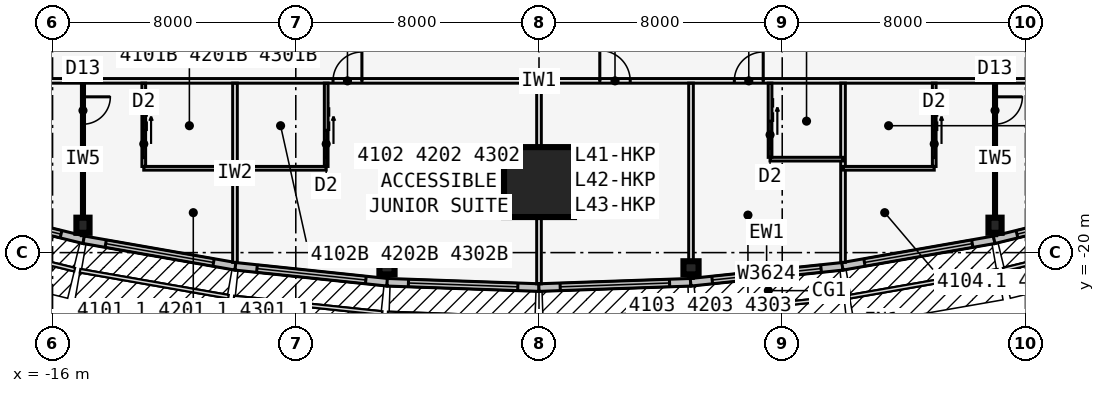
"""IFC4 building model, lengths in metres.
Left out: names, types, materials, properties, quantities, classifications, styles, units other than length and angle.
Written with IfcOpenShell. Run it as: python <this file> out.ifc"""

import sys

from ifc_helpers import new_model, si_unit, direction, frame, frame_2d, origin, origin_2d, place, context, subcontext, project, spatial, rectangle, i_section, extrude, element, fill, save


model = new_model("IFC4")
c1 = context("Model", 3, precision=1e-05, world=origin(), true_north=direction((0.0, 1.0)))
c2 = subcontext(c1, "Body", "Model", "MODEL_VIEW")
j1 = project(units=[si_unit("LENGTHUNIT", "METRE"), si_unit("PLANEANGLEUNIT", "RADIAN")], contexts=[c1])
p1 = place(None, origin())
s1 = spatial("IfcSite", under=j1, at=p1, CompositionType="ELEMENT")
p2 = place(p1, origin())
s2 = spatial("IfcBuilding", under=s1, at=p2, CompositionType="ELEMENT")
p3 = place(p2, frame((0.0, 0.0, 155.5)))
s3 = spatial("IfcBuildingStorey", under=s2, at=p3, CompositionType="ELEMENT", Elevation=155.5)
for number, where, z_axis, x_axis in (
    (1, (-15.0, -19.1, 0.0), (0.0, 0.0, 1.0), (1.0, 0.0, 0.0)),
    (2, (-5.0, -20.5, 0.0), (0.0, 0.0, 1.0), (0.0, -1.0, 0.0)),
    (3, (5.0, -20.5, 0.0), (0.0, 0.0, 1.0), (0.0, -1.0, 0.0)),
    (4, (15.0, -19.1, 0.0), (0.0, 0.0, 1.0), (1.0, 0.0, 0.0)),
):
    element("IfcColumn", number, at=place(p3, frame(where, z_axis=z_axis, x_axis=x_axis)), inside=s3, PredefinedType="COLUMN", context=c2, shape_type="SweptSolid", body=[
        extrude(i_section(OverallWidth=0.432, OverallDepth=0.498, WebThickness=0.056, FlangeThickness=0.089, at=origin_2d()), origin(), (0.0, 0.0, 1.0), 3.4),
    ])
p4 = place(p3, frame((0.0, -17.68, 0.0), z_axis=(0.0, 0.0, 1.0), x_axis=(0.0, -1.0, 0.0)))
e5 = element("IfcColumn", 5, at=p4, inside=s3, PredefinedType="COLUMN", context=c2, shape_type="SweptSolid", body=[
    extrude(rectangle(XDim=2.3, YDim=2.3, at=origin_2d()), origin(), (0.0, 0.0, 1.0), 3.4),
])
p5 = place(p3, frame((-19.97, -18.354, 0.0), z_axis=(0.0, 0.0, 1.0), x_axis=(0.971270024053, -0.237980126011, 0.0)))
e6 = element("IfcWall", 6, at=p5, inside=s3, PredefinedType="STANDARD", context=c2, shape_type="SweptSolid", body=[
    extrude(rectangle(XDim=5.148, YDim=0.25, at=frame_2d((2.574, 0.0))), origin(), (0.0, 0.0, 1.0), 3.235),
])
p6 = place(p5, frame((0.774, 0.0, 0.45)))
e7 = element("IfcOpeningElement", 7, at=p6, cuts=e6, PredefinedType="OPENING", context=c2, shape_type="SweptSolid", body=[
    extrude(rectangle(XDim=3.6, YDim=2.4, at=frame_2d((1.8, 1.2))), frame((0.0, 0.135, 0.0), z_axis=(0.0, -1.0, 0.0), x_axis=(1.0, 0.0, 0.0)), (0.0, 0.0, 1.0), 0.27),
])
p7 = place(p3, frame((-14.979, -19.577, 0.0), z_axis=(0.0, 0.0, 1.0), x_axis=(0.985030467156, -0.172380331752, 0.0)))
e8 = element("IfcWall", 8, at=p7, inside=s3, PredefinedType="STANDARD", context=c2, shape_type="SweptSolid", body=[
    extrude(rectangle(XDim=5.076, YDim=0.25, at=frame_2d((2.538, 0.0))), origin(), (0.0, 0.0, 1.0), 3.235),
])
p8 = place(p7, frame((0.738, 0.0, 0.45)))
e9 = element("IfcOpeningElement", 9, at=p8, cuts=e8, PredefinedType="OPENING", context=c2, shape_type="SweptSolid", body=[
    extrude(rectangle(XDim=3.6, YDim=2.4, at=frame_2d((1.8, 1.2))), frame((0.0, 0.135, 0.0), z_axis=(0.0, -1.0, 0.0), x_axis=(1.0, 0.0, 0.0)), (0.0, 0.0, 1.0), 0.27),
])
p9 = place(p3, frame((-9.987, -20.451, 0.0), z_axis=(0.0, 0.0, 1.0), x_axis=(0.994534683851, -0.104406717299, 0.0)))
e10 = element("IfcWall", 10, at=p9, inside=s3, PredefinedType="STANDARD", context=c2, shape_type="SweptSolid", body=[
    extrude(rectangle(XDim=5.028, YDim=0.25, at=frame_2d((2.514, 0.0))), origin(), (0.0, 0.0, 1.0), 3.235),
])
p10 = place(p9, frame((0.714, 0.0, 0.45)))
e11 = element("IfcOpeningElement", 11, at=p10, cuts=e10, PredefinedType="OPENING", context=c2, shape_type="SweptSolid", body=[
    extrude(rectangle(XDim=3.6, YDim=2.4, at=frame_2d((1.8, 1.2))), frame((0.0, 0.135, 0.0), z_axis=(0.0, -1.0, 0.0), x_axis=(1.0, 0.0, 0.0)), (0.0, 0.0, 1.0), 0.27),
])
p11 = place(p3, frame((-4.996, -20.975, 0.0), z_axis=(0.0, 0.0, 1.0), x_axis=(0.999387720943, -0.034988329879, 0.0)))
e12 = element("IfcWall", 12, at=p11, inside=s3, PredefinedType="STANDARD", context=c2, shape_type="SweptSolid", body=[
    extrude(rectangle(XDim=5.003, YDim=0.25, at=frame_2d((2.501, 0.0))), origin(), (0.0, 0.0, 1.0), 3.235),
])
p12 = place(p11, frame((0.701, 0.0, 0.45)))
e13 = element("IfcOpeningElement", 13, at=p12, cuts=e12, PredefinedType="OPENING", context=c2, shape_type="SweptSolid", body=[
    extrude(rectangle(XDim=3.6, YDim=2.4, at=frame_2d((1.8, 1.2))), frame((0.0, 0.135, 0.0), z_axis=(0.0, -1.0, 0.0), x_axis=(1.0, 0.0, 0.0)), (0.0, 0.0, 1.0), 0.27),
])
p13 = place(p3, frame((-0.004, -21.15, 0.0), z_axis=(0.0, 0.0, 1.0), x_axis=(0.999387720943, 0.034988329879, 0.0)))
e14 = element("IfcWall", 14, at=p13, inside=s3, PredefinedType="STANDARD", context=c2, shape_type="SweptSolid", body=[
    extrude(rectangle(XDim=5.003, YDim=0.25, at=frame_2d((2.501, 0.0))), origin(), (0.0, 0.0, 1.0), 3.235),
])
p14 = place(p13, frame((0.701, 0.0, 0.45)))
e15 = element("IfcOpeningElement", 15, at=p14, cuts=e14, PredefinedType="OPENING", context=c2, shape_type="SweptSolid", body=[
    extrude(rectangle(XDim=3.6, YDim=2.4, at=frame_2d((1.8, 1.2))), frame((0.0, 0.135, 0.0), z_axis=(0.0, -1.0, 0.0), x_axis=(1.0, 0.0, 0.0)), (0.0, 0.0, 1.0), 0.27),
])
p15 = place(p3, frame((4.987, -20.976, 0.0), z_axis=(0.0, 0.0, 1.0), x_axis=(0.994534683851, 0.104406717299, 0.0)))
e16 = element("IfcWall", 16, at=p15, inside=s3, PredefinedType="STANDARD", context=c2, shape_type="SweptSolid", body=[
    extrude(rectangle(XDim=5.028, YDim=0.25, at=frame_2d((2.514, 0.0))), origin(), (0.0, 0.0, 1.0), 3.235),
])
p16 = place(p15, frame((0.714, 0.0, 0.45)))
e17 = element("IfcOpeningElement", 17, at=p16, cuts=e16, PredefinedType="OPENING", context=c2, shape_type="SweptSolid", body=[
    extrude(rectangle(XDim=3.6, YDim=2.4, at=frame_2d((1.8, 1.2))), frame((0.0, 0.135, 0.0), z_axis=(0.0, -1.0, 0.0), x_axis=(1.0, 0.0, 0.0)), (0.0, 0.0, 1.0), 0.27),
])
p17 = place(p3, frame((9.979, -20.452, 0.0), z_axis=(0.0, 0.0, 1.0), x_axis=(0.985030467156, 0.172380331752, 0.0)))
e18 = element("IfcWall", 18, at=p17, inside=s3, PredefinedType="STANDARD", context=c2, shape_type="SweptSolid", body=[
    extrude(rectangle(XDim=5.076, YDim=0.25, at=frame_2d((2.538, 0.0))), origin(), (0.0, 0.0, 1.0), 3.235),
])
p18 = place(p17, frame((0.738, 0.0, 0.45)))
e19 = element("IfcOpeningElement", 19, at=p18, cuts=e18, PredefinedType="OPENING", context=c2, shape_type="SweptSolid", body=[
    extrude(rectangle(XDim=3.6, YDim=2.4, at=frame_2d((1.8, 1.2))), frame((0.0, 0.135, 0.0), z_axis=(0.0, -1.0, 0.0), x_axis=(1.0, 0.0, 0.0)), (0.0, 0.0, 1.0), 0.27),
])
p19 = place(p3, frame((14.97, -19.579, 0.0), z_axis=(0.0, 0.0, 1.0), x_axis=(0.971270024053, 0.237980126011, 0.0)))
e20 = element("IfcWall", 20, at=p19, inside=s3, PredefinedType="STANDARD", context=c2, shape_type="SweptSolid", body=[
    extrude(rectangle(XDim=5.148, YDim=0.25, at=frame_2d((2.574, 0.0))), origin(), (0.0, 0.0, 1.0), 3.235),
])
p20 = place(p19, frame((0.774, 0.0, 0.45)))
e21 = element("IfcOpeningElement", 21, at=p20, cuts=e20, PredefinedType="OPENING", context=c2, shape_type="SweptSolid", body=[
    extrude(rectangle(XDim=3.6, YDim=2.4, at=frame_2d((1.8, 1.2))), frame((0.0, 0.135, 0.0), z_axis=(0.0, -1.0, 0.0), x_axis=(1.0, 0.0, 0.0)), (0.0, 0.0, 1.0), 0.27),
])
p21 = place(p3, frame((-23.857, -14.351, 0.0), z_axis=(0.0, 0.0, 1.0), x_axis=(1.0, 0.0, 0.0)))
e22 = element("IfcWall", 22, at=p21, inside=s3, PredefinedType="PARTITIONING", context=c2, shape_type="SweptSolid", body=[
    extrude(rectangle(XDim=47.714, YDim=0.15, at=frame_2d((23.857, 0.0))), origin(), (0.0, 0.0, 1.0), 3.235),
])
p22 = place(p21, frame((3.723, 0.0, 0.0)))
e23 = element("IfcOpeningElement", 23, at=p22, cuts=e22, PredefinedType="OPENING", context=c2, shape_type="SweptSolid", body=[
    extrude(rectangle(XDim=0.95, YDim=2.13, at=frame_2d((0.475, 1.065))), frame((0.0, 0.085, 0.0), z_axis=(0.0, -1.0, 0.0), x_axis=(1.0, 0.0, 0.0)), (0.0, 0.0, 1.0), 0.17),
])
p23 = place(p21, frame((17.082, 0.0, 0.0)))
e24 = element("IfcOpeningElement", 24, at=p23, cuts=e22, PredefinedType="OPENING", context=c2, shape_type="SweptSolid", body=[
    extrude(rectangle(XDim=0.95, YDim=2.13, at=frame_2d((0.475, 1.065))), frame((0.0, 0.085, 0.0), z_axis=(0.0, -1.0, 0.0), x_axis=(1.0, 0.0, 0.0)), (0.0, 0.0, 1.0), 0.17),
])
p24 = place(p21, frame((25.857, 0.0, 0.0)))
e25 = element("IfcOpeningElement", 25, at=p24, cuts=e22, PredefinedType="OPENING", context=c2, shape_type="SweptSolid", body=[
    extrude(rectangle(XDim=1.0, YDim=2.13, at=frame_2d((0.5, 1.065))), frame((0.0, 0.085, 0.0), z_axis=(0.0, -1.0, 0.0), x_axis=(1.0, 0.0, 0.0)), (0.0, 0.0, 1.0), 0.17),
])
p25 = place(p21, frame((30.282, 0.0, 0.0)))
e26 = element("IfcOpeningElement", 26, at=p25, cuts=e22, PredefinedType="OPENING", context=c2, shape_type="SweptSolid", body=[
    extrude(rectangle(XDim=0.95, YDim=2.13, at=frame_2d((0.475, 1.065))), frame((0.0, 0.085, 0.0), z_axis=(0.0, -1.0, 0.0), x_axis=(1.0, 0.0, 0.0)), (0.0, 0.0, 1.0), 0.17),
])
p26 = place(p21, frame((43.041, 0.0, 0.0)))
e27 = element("IfcOpeningElement", 27, at=p26, cuts=e22, PredefinedType="OPENING", context=c2, shape_type="SweptSolid", body=[
    extrude(rectangle(XDim=0.95, YDim=2.13, at=frame_2d((0.475, 1.065))), frame((0.0, 0.085, 0.0), z_axis=(0.0, -1.0, 0.0), x_axis=(1.0, 0.0, 0.0)), (0.0, 0.0, 1.0), 0.17),
])
p27 = place(p3, frame((-15.0, -14.426, 0.0), z_axis=(0.0, 0.0, 1.0), x_axis=(0.0, -1.0, 0.0)))
e28 = element("IfcWall", 28, at=p27, inside=s3, PredefinedType="PARTITIONING", context=c2, shape_type="SweptSolid", body=[
    extrude(rectangle(XDim=5.017, YDim=0.1, at=frame_2d((2.508, 0.0))), origin(), (0.0, 0.0, 1.0), 2.389),
])
p28 = place(p27, frame((0.45, 0.0, 0.0)))
e29 = element("IfcOpeningElement", 29, at=p28, cuts=e28, PredefinedType="OPENING", context=c2, shape_type="SweptSolid", body=[
    extrude(rectangle(XDim=0.9, YDim=2.13, at=frame_2d((0.45, 1.065))), frame((0.0, 0.06, 0.0), z_axis=(0.0, -1.0, 0.0), x_axis=(1.0, 0.0, 0.0)), (0.0, 0.0, 1.0), 0.12),
])
p29 = place(p3, frame((-10.0, -14.426, 0.0), z_axis=(0.0, 0.0, 1.0), x_axis=(0.0, -1.0, 0.0)))
e30 = element("IfcWall", 30, at=p29, inside=s3, PredefinedType="PARTITIONING", context=c2, shape_type="SweptSolid", body=[
    extrude(rectangle(XDim=5.895, YDim=0.15, at=frame_2d((2.948, 0.0))), origin(), (0.0, 0.0, 1.0), 2.389),
])
p30 = place(p3, frame((0.0, -14.426, 0.0), z_axis=(0.0, 0.0, 1.0), x_axis=(0.0, -1.0, 0.0)))
e31 = element("IfcWall", 31, at=p30, inside=s3, PredefinedType="PARTITIONING", context=c2, shape_type="SweptSolid", body=[
    extrude(rectangle(XDim=6.599, YDim=0.15, at=frame_2d((3.299, 0.0))), origin(), (0.0, 0.0, 1.0), 2.389),
])
p31 = place(p3, frame((5.0, -14.426, 0.0), z_axis=(0.0, 0.0, 1.0), x_axis=(0.0, -1.0, 0.0)))
e32 = element("IfcWall", 32, at=p31, inside=s3, PredefinedType="PARTITIONING", context=c2, shape_type="SweptSolid", body=[
    extrude(rectangle(XDim=6.423, YDim=0.15, at=frame_2d((3.211, 0.0))), origin(), (0.0, 0.0, 1.0), 2.389),
])
p32 = place(p3, frame((10.0, -14.426, 0.0), z_axis=(0.0, 0.0, 1.0), x_axis=(0.0, -1.0, 0.0)))
e33 = element("IfcWall", 33, at=p32, inside=s3, PredefinedType="PARTITIONING", context=c2, shape_type="SweptSolid", body=[
    extrude(rectangle(XDim=5.895, YDim=0.15, at=frame_2d((2.948, 0.0))), origin(), (0.0, 0.0, 1.0), 2.389),
])
p33 = place(p3, frame((15.0, -14.426, 0.0), z_axis=(0.0, 0.0, 1.0), x_axis=(0.0, -1.0, 0.0)))
e34 = element("IfcWall", 34, at=p33, inside=s3, PredefinedType="PARTITIONING", context=c2, shape_type="SweptSolid", body=[
    extrude(rectangle(XDim=5.017, YDim=0.1, at=frame_2d((2.508, 0.0))), origin(), (0.0, 0.0, 1.0), 2.389),
])
p34 = place(p33, frame((0.45, 0.0, 0.0)))
e35 = element("IfcOpeningElement", 35, at=p34, cuts=e34, PredefinedType="OPENING", context=c2, shape_type="SweptSolid", body=[
    extrude(rectangle(XDim=0.9, YDim=2.13, at=frame_2d((0.45, 1.065))), frame((0.0, 0.06, 0.0), z_axis=(0.0, -1.0, 0.0), x_axis=(1.0, 0.0, 0.0)), (0.0, 0.0, 1.0), 0.12),
])
p35 = place(p3, frame((-13.0, -17.226, 0.0), z_axis=(0.0, 0.0, 1.0), x_axis=(1.0, 0.0, 0.0)))
e36 = element("IfcWall", 36, at=p35, inside=s3, PredefinedType="PLUMBINGWALL", context=c2, shape_type="SweptSolid", body=[
    extrude(rectangle(XDim=3.0, YDim=0.12, at=frame_2d((1.5, 0.0))), origin(), (0.0, 0.0, 1.0), 3.235),
])
p36 = place(p3, frame((-13.0, -14.426, 0.0), z_axis=(0.0, 0.0, 1.0), x_axis=(0.0, -1.0, 0.0)))
e37 = element("IfcWall", 37, at=p36, inside=s3, PredefinedType="PLUMBINGWALL", context=c2, shape_type="SweptSolid", body=[
    extrude(rectangle(XDim=2.74, YDim=0.12, at=frame_2d((1.37, 0.0))), origin(), (0.0, 0.0, 1.0), 3.235),
])
p37 = place(p36, frame((1.55, 0.0, 0.0)))
e38 = element("IfcOpeningElement", 38, at=p37, cuts=e37, PredefinedType="OPENING", context=c2, shape_type="SweptSolid", body=[
    extrude(rectangle(XDim=0.9, YDim=2.13, at=frame_2d((0.45, 1.065))), frame((0.0, 0.07, 0.0), z_axis=(0.0, -1.0, 0.0), x_axis=(1.0, 0.0, 0.0)), (0.0, 0.0, 1.0), 0.14),
])
p38 = place(p3, frame((-10.0, -17.226, 0.0), z_axis=(0.0, 0.0, 1.0), x_axis=(1.0, 0.0, 0.0)))
e39 = element("IfcWall", 39, at=p38, inside=s3, PredefinedType="PLUMBINGWALL", context=c2, shape_type="SweptSolid", body=[
    extrude(rectangle(XDim=3.0, YDim=0.12, at=frame_2d((1.5, 0.0))), origin(), (0.0, 0.0, 1.0), 3.235),
])
p39 = place(p3, frame((-7.0, -14.426, 0.0), z_axis=(0.0, 0.0, 1.0), x_axis=(0.0, -1.0, 0.0)))
e40 = element("IfcWall", 40, at=p39, inside=s3, PredefinedType="PLUMBINGWALL", context=c2, shape_type="SweptSolid", body=[
    extrude(rectangle(XDim=2.74, YDim=0.12, at=frame_2d((1.37, 0.0))), origin(), (0.0, 0.0, 1.0), 3.235),
])
p40 = place(p39, frame((1.55, 0.0, 0.0)))
e41 = element("IfcOpeningElement", 41, at=p40, cuts=e40, PredefinedType="OPENING", context=c2, shape_type="SweptSolid", body=[
    extrude(rectangle(XDim=0.9, YDim=2.13, at=frame_2d((0.45, 1.065))), frame((0.0, 0.07, 0.0), z_axis=(0.0, -1.0, 0.0), x_axis=(1.0, 0.0, 0.0)), (0.0, 0.0, 1.0), 0.14),
])
p41 = place(p3, frame((7.6, -16.926, 0.0), z_axis=(0.0, 0.0, 1.0), x_axis=(1.0, 0.0, 0.0)))
e42 = element("IfcWall", 42, at=p41, inside=s3, PredefinedType="PLUMBINGWALL", context=c2, shape_type="SweptSolid", body=[
    extrude(rectangle(XDim=2.4, YDim=0.12, at=frame_2d((1.2, 0.0))), origin(), (0.0, 0.0, 1.0), 3.235),
])
p42 = place(p3, frame((7.6, -14.426, 0.0), z_axis=(0.0, 0.0, 1.0), x_axis=(0.0, -1.0, 0.0)))
e43 = element("IfcWall", 43, at=p42, inside=s3, PredefinedType="PLUMBINGWALL", context=c2, shape_type="SweptSolid", body=[
    extrude(rectangle(XDim=2.44, YDim=0.12, at=frame_2d((1.22, 0.0))), origin(), (0.0, 0.0, 1.0), 3.235),
])
p43 = place(p42, frame((1.25, 0.0, 0.0)))
e44 = element("IfcOpeningElement", 44, at=p43, cuts=e43, PredefinedType="OPENING", context=c2, shape_type="SweptSolid", body=[
    extrude(rectangle(XDim=0.9, YDim=2.13, at=frame_2d((0.45, 1.065))), frame((0.0, 0.07, 0.0), z_axis=(0.0, -1.0, 0.0), x_axis=(1.0, 0.0, 0.0)), (0.0, 0.0, 1.0), 0.14),
])
p44 = place(p3, frame((10.0, -17.226, 0.0), z_axis=(0.0, 0.0, 1.0), x_axis=(1.0, 0.0, 0.0)))
e45 = element("IfcWall", 45, at=p44, inside=s3, PredefinedType="PLUMBINGWALL", context=c2, shape_type="SweptSolid", body=[
    extrude(rectangle(XDim=3.0, YDim=0.12, at=frame_2d((1.5, 0.0))), origin(), (0.0, 0.0, 1.0), 3.235),
])
p45 = place(p3, frame((13.0, -14.426, 0.0), z_axis=(0.0, 0.0, 1.0), x_axis=(0.0, -1.0, 0.0)))
e46 = element("IfcWall", 46, at=p45, inside=s3, PredefinedType="PLUMBINGWALL", context=c2, shape_type="SweptSolid", body=[
    extrude(rectangle(XDim=2.74, YDim=0.12, at=frame_2d((1.37, 0.0))), origin(), (0.0, 0.0, 1.0), 3.235),
])
p46 = place(p45, frame((1.55, 0.0, 0.0)))
e47 = element("IfcOpeningElement", 47, at=p46, cuts=e46, PredefinedType="OPENING", context=c2, shape_type="SweptSolid", body=[
    extrude(rectangle(XDim=0.9, YDim=2.13, at=frame_2d((0.45, 1.065))), frame((0.0, 0.07, 0.0), z_axis=(0.0, -1.0, 0.0), x_axis=(1.0, 0.0, 0.0)), (0.0, 0.0, 1.0), 0.14),
])
p47 = place(p6, origin())
e48 = element("IfcWindow", 48, at=p47, inside=s3, PartitioningType="SINGLE_PANEL", PredefinedType="WINDOW", context=c2, shape_type="SweptSolid", body=[
    extrude(rectangle(XDim=3.6, YDim=2.4, at=frame_2d((1.8, 1.2))), frame((0.0, 0.03, 0.0), z_axis=(0.0, -1.0, 0.0), x_axis=(1.0, 0.0, 0.0)), (0.0, 0.0, 1.0), 0.06),
])
fill(e7, e48)
p48 = place(p8, origin())
e49 = element("IfcWindow", 49, at=p48, inside=s3, PartitioningType="SINGLE_PANEL", PredefinedType="WINDOW", context=c2, shape_type="SweptSolid", body=[
    extrude(rectangle(XDim=3.6, YDim=2.4, at=frame_2d((1.8, 1.2))), frame((0.0, 0.03, 0.0), z_axis=(0.0, -1.0, 0.0), x_axis=(1.0, 0.0, 0.0)), (0.0, 0.0, 1.0), 0.06),
])
fill(e9, e49)
p49 = place(p10, origin())
e50 = element("IfcWindow", 50, at=p49, inside=s3, PartitioningType="SINGLE_PANEL", PredefinedType="WINDOW", context=c2, shape_type="SweptSolid", body=[
    extrude(rectangle(XDim=3.6, YDim=2.4, at=frame_2d((1.8, 1.2))), frame((0.0, 0.03, 0.0), z_axis=(0.0, -1.0, 0.0), x_axis=(1.0, 0.0, 0.0)), (0.0, 0.0, 1.0), 0.06),
])
fill(e11, e50)
p50 = place(p12, origin())
e51 = element("IfcWindow", 51, at=p50, inside=s3, PartitioningType="SINGLE_PANEL", PredefinedType="WINDOW", context=c2, shape_type="SweptSolid", body=[
    extrude(rectangle(XDim=3.6, YDim=2.4, at=frame_2d((1.8, 1.2))), frame((0.0, 0.03, 0.0), z_axis=(0.0, -1.0, 0.0), x_axis=(1.0, 0.0, 0.0)), (0.0, 0.0, 1.0), 0.06),
])
fill(e13, e51)
p51 = place(p14, origin())
e52 = element("IfcWindow", 52, at=p51, inside=s3, PartitioningType="SINGLE_PANEL", PredefinedType="WINDOW", context=c2, shape_type="SweptSolid", body=[
    extrude(rectangle(XDim=3.6, YDim=2.4, at=frame_2d((1.8, 1.2))), frame((0.0, 0.03, 0.0), z_axis=(0.0, -1.0, 0.0), x_axis=(1.0, 0.0, 0.0)), (0.0, 0.0, 1.0), 0.06),
])
fill(e15, e52)
p52 = place(p16, origin())
e53 = element("IfcWindow", 53, at=p52, inside=s3, PartitioningType="SINGLE_PANEL", PredefinedType="WINDOW", context=c2, shape_type="SweptSolid", body=[
    extrude(rectangle(XDim=3.6, YDim=2.4, at=frame_2d((1.8, 1.2))), frame((0.0, 0.03, 0.0), z_axis=(0.0, -1.0, 0.0), x_axis=(1.0, 0.0, 0.0)), (0.0, 0.0, 1.0), 0.06),
])
fill(e17, e53)
p53 = place(p18, origin())
e54 = element("IfcWindow", 54, at=p53, inside=s3, PartitioningType="SINGLE_PANEL", PredefinedType="WINDOW", context=c2, shape_type="SweptSolid", body=[
    extrude(rectangle(XDim=3.6, YDim=2.4, at=frame_2d((1.8, 1.2))), frame((0.0, 0.03, 0.0), z_axis=(0.0, -1.0, 0.0), x_axis=(1.0, 0.0, 0.0)), (0.0, 0.0, 1.0), 0.06),
])
fill(e19, e54)
p54 = place(p20, origin())
e55 = element("IfcWindow", 55, at=p54, inside=s3, PartitioningType="SINGLE_PANEL", PredefinedType="WINDOW", context=c2, shape_type="SweptSolid", body=[
    extrude(rectangle(XDim=3.6, YDim=2.4, at=frame_2d((1.8, 1.2))), frame((0.0, 0.03, 0.0), z_axis=(0.0, -1.0, 0.0), x_axis=(1.0, 0.0, 0.0)), (0.0, 0.0, 1.0), 0.06),
])
fill(e21, e55)
p55 = place(p28, origin())
e56 = element("IfcDoor", 56, at=p55, inside=s3, OperationType="SINGLE_SWING_LEFT", PredefinedType="DOOR", context=c2, shape_type="SweptSolid", body=[
    extrude(rectangle(XDim=0.9, YDim=2.13, at=frame_2d((0.45, 1.065))), frame((0.0, 0.025, 0.0), z_axis=(0.0, -1.0, 0.0), x_axis=(1.0, 0.0, 0.0)), (0.0, 0.0, 1.0), 0.05),
])
fill(e29, e56)
p56 = place(p34, origin())
e57 = element("IfcDoor", 57, at=p56, inside=s3, OperationType="SINGLE_SWING_LEFT", PredefinedType="DOOR", context=c2, shape_type="SweptSolid", body=[
    extrude(rectangle(XDim=0.9, YDim=2.13, at=frame_2d((0.45, 1.065))), frame((0.0, 0.025, 0.0), z_axis=(0.0, -1.0, 0.0), x_axis=(1.0, 0.0, 0.0)), (0.0, 0.0, 1.0), 0.05),
])
fill(e35, e57)
p57 = place(p37, origin())
e58 = element("IfcDoor", 58, at=p57, inside=s3, OperationType="SLIDING_TO_LEFT", PredefinedType="DOOR", context=c2, shape_type="SweptSolid", body=[
    extrude(rectangle(XDim=0.9, YDim=2.13, at=frame_2d((0.45, 1.065))), frame((0.0, 0.025, 0.0), z_axis=(0.0, -1.0, 0.0), x_axis=(1.0, 0.0, 0.0)), (0.0, 0.0, 1.0), 0.05),
])
fill(e38, e58)
p58 = place(p40, origin())
e59 = element("IfcDoor", 59, at=p58, inside=s3, OperationType="SLIDING_TO_LEFT", PredefinedType="DOOR", context=c2, shape_type="SweptSolid", body=[
    extrude(rectangle(XDim=0.9, YDim=2.13, at=frame_2d((0.45, 1.065))), frame((0.0, 0.025, 0.0), z_axis=(0.0, -1.0, 0.0), x_axis=(1.0, 0.0, 0.0)), (0.0, 0.0, 1.0), 0.05),
])
fill(e41, e59)
p59 = place(p23, origin())
e60 = element("IfcDoor", 60, at=p59, inside=s3, OperationType="SINGLE_SWING_RIGHT", PredefinedType="DOOR", context=c2, shape_type="SweptSolid", body=[
    extrude(rectangle(XDim=0.95, YDim=2.13, at=frame_2d((0.475, 1.065))), frame((0.0, 0.025, 0.0), z_axis=(0.0, -1.0, 0.0), x_axis=(1.0, 0.0, 0.0)), (0.0, 0.0, 1.0), 0.05),
])
fill(e24, e60)
p60 = place(p24, origin())
e61 = element("IfcDoor", 61, at=p60, inside=s3, OperationType="SINGLE_SWING_LEFT", PredefinedType="DOOR", context=c2, shape_type="SweptSolid", body=[
    extrude(rectangle(XDim=1.0, YDim=2.13, at=frame_2d((0.5, 1.065))), frame((0.0, 0.025, 0.0), z_axis=(0.0, -1.0, 0.0), x_axis=(1.0, 0.0, 0.0)), (0.0, 0.0, 1.0), 0.05),
])
fill(e25, e61)
p61 = place(p43, origin())
e62 = element("IfcDoor", 62, at=p61, inside=s3, OperationType="SLIDING_TO_LEFT", PredefinedType="DOOR", context=c2, shape_type="SweptSolid", body=[
    extrude(rectangle(XDim=0.9, YDim=2.13, at=frame_2d((0.45, 1.065))), frame((0.0, 0.025, 0.0), z_axis=(0.0, -1.0, 0.0), x_axis=(1.0, 0.0, 0.0)), (0.0, 0.0, 1.0), 0.05),
])
fill(e44, e62)
p62 = place(p25, origin())
e63 = element("IfcDoor", 63, at=p62, inside=s3, OperationType="SINGLE_SWING_RIGHT", PredefinedType="DOOR", context=c2, shape_type="SweptSolid", body=[
    extrude(rectangle(XDim=0.95, YDim=2.13, at=frame_2d((0.475, 1.065))), frame((0.0, 0.025, 0.0), z_axis=(0.0, -1.0, 0.0), x_axis=(1.0, 0.0, 0.0)), (0.0, 0.0, 1.0), 0.05),
])
fill(e26, e63)
p63 = place(p46, origin())
e64 = element("IfcDoor", 64, at=p63, inside=s3, OperationType="SLIDING_TO_LEFT", PredefinedType="DOOR", context=c2, shape_type="SweptSolid", body=[
    extrude(rectangle(XDim=0.9, YDim=2.13, at=frame_2d((0.45, 1.065))), frame((0.0, 0.025, 0.0), z_axis=(0.0, -1.0, 0.0), x_axis=(1.0, 0.0, 0.0)), (0.0, 0.0, 1.0), 0.05),
])
fill(e47, e64)
save(model, sys.argv[1])
